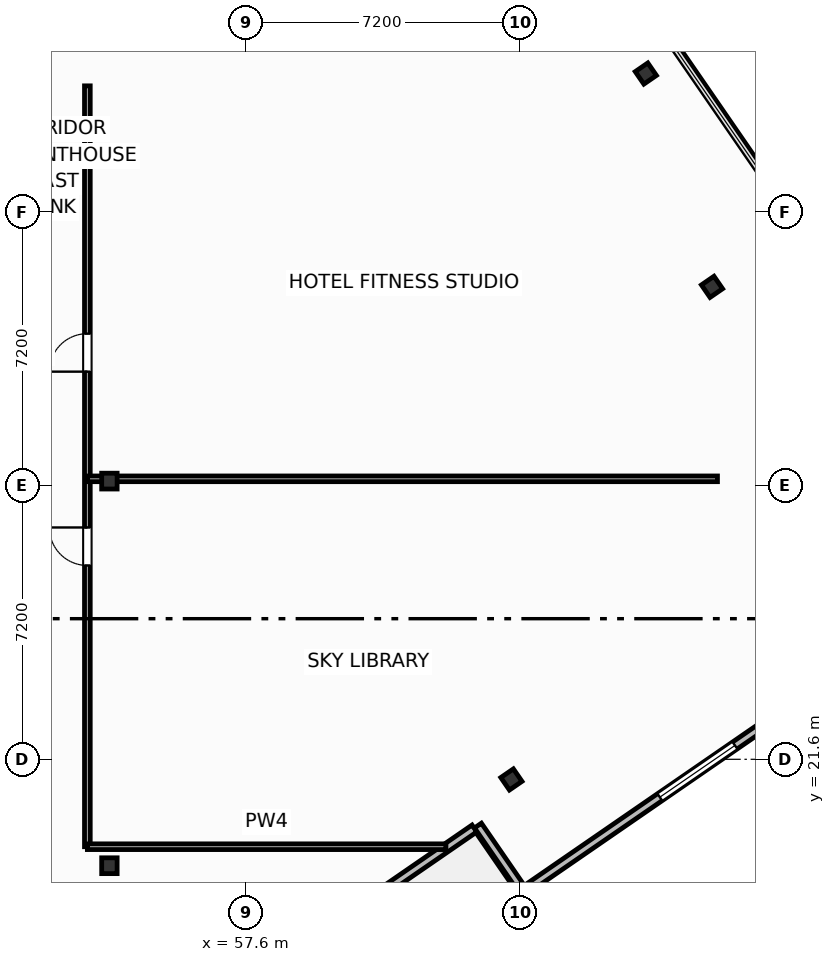
"""IFC4 building model, lengths in metres.
Left out: names, types, materials, properties, quantities, classifications, styles, units other than length and angle.
Written with IfcOpenShell. Run it as: python <this file> out.ifc"""

import sys

from ifc_helpers import new_model, si_unit, direction, frame, frame_2d, origin, origin_2d, place, context, subcontext, project, spatial, rectangle, i_section, extrude, element, fill, save


model = new_model("IFC4")
c1 = context("Model", 3, precision=1e-05, world=origin(), true_north=direction((0.0, 1.0)))
c2 = subcontext(c1, "Body", "Model", "MODEL_VIEW")
j1 = project(units=[si_unit("LENGTHUNIT", "METRE"), si_unit("PLANEANGLEUNIT", "RADIAN")], contexts=[c1])
p1 = place(None, origin())
s1 = spatial("IfcSite", under=j1, at=p1, CompositionType="ELEMENT")
p2 = place(p1, origin())
s2 = spatial("IfcBuilding", under=s1, at=p2, CompositionType="ELEMENT")
p3 = place(p2, frame((0.0, 0.0, 284.1)))
s3 = spatial("IfcBuildingStorey", under=s2, at=p3, CompositionType="ELEMENT", Elevation=284.1)
for number, where, z_axis, x_axis in (
    (1, (54.0, 18.8, 0.0), (0.0, 0.0, 1.0), (1.0, 0.0, 0.0)),
    (2, (54.0, 28.92, 0.0), (0.0, 0.0, 1.0), (1.0, 0.0, 0.0)),
):
    element("IfcColumn", number, at=place(p3, frame(where, z_axis=z_axis, x_axis=x_axis)), inside=s3, PredefinedType="COLUMN", context=c2, shape_type="SweptSolid", body=[
        extrude(i_section(OverallWidth=0.406, OverallDepth=0.416, WebThickness=0.03, FlangeThickness=0.048, FilletRadius=0.025, at=origin_2d()), origin(), (0.0, 0.0, 1.0), 3.7),
    ])
for number, where, z_axis, x_axis in (
    (3, (64.578, 21.07, 0.0), (0.0, 0.0, 1.0), (0.824, 0.567, 0.0)),
    (4, (69.857, 34.031, 0.0), (0.0, 0.0, 1.0), (0.824, 0.567, 0.0)),
    (5, (68.115, 39.644, 0.0), (0.0, 0.0, 1.0), (0.824, 0.567, 0.0)),
):
    element("IfcColumn", number, at=place(p3, frame(where, z_axis=z_axis, x_axis=x_axis)), inside=s3, PredefinedType="COLUMN", context=c2, shape_type="SweptSolid", body=[
        extrude(i_section(OverallWidth=0.401, OverallDepth=0.399, WebThickness=0.025, FlangeThickness=0.04, FilletRadius=0.022, at=origin_2d()), origin(), (0.0, 0.0, 1.0), 3.7),
    ])
p4 = place(p3, frame((63.605, 19.78, 0.0), z_axis=(0.0, 0.0, 1.0), x_axis=(-0.823541290762, -0.567256328665, 0.0)))
e6 = element("IfcWall", 6, at=p4, inside=s3, PredefinedType="SOLIDWALL", context=c2, shape_type="SweptSolid", body=[
    extrude(rectangle(XDim=5.567, YDim=0.22, at=frame_2d((2.784, 0.0))), origin(), (0.0, 0.0, 1.0), 2.73),
])
p5 = place(p4, frame((3.067, 0.0, 0.0)))
e7 = element("IfcOpeningElement", 7, at=p5, cuts=e6, PredefinedType="OPENING", context=c2, shape_type="SweptSolid", body=[
    extrude(rectangle(XDim=2.1, YDim=2.3, at=frame_2d((1.05, 1.15))), frame((0.0, 0.12, 0.0), z_axis=(0.0, -1.0, 0.0), x_axis=(1.0, 0.0, 0.0)), (0.0, 0.0, 1.0), 0.24),
])
p6 = place(p3, frame((63.698, 19.856, 0.0), z_axis=(0.0, 0.0, 1.0), x_axis=(0.567219383419, -0.823566737474, 0.0)))
e8 = element("IfcWall", 8, at=p6, inside=s3, PredefinedType="SOLIDWALL", context=c2, shape_type="SweptSolid", body=[
    extrude(rectangle(XDim=2.1, YDim=0.22, at=frame_2d((1.05, 0.0))), origin(), (0.0, 0.0, 1.0), 2.73),
])
p7 = place(p3, frame((64.992, 18.198, 0.0), z_axis=(0.0, 0.0, 1.0), x_axis=(0.823538117322, 0.56726093583, 0.0)))
e9 = element("IfcWall", 9, at=p7, inside=s3, PredefinedType="SOLIDWALL", context=c2, shape_type="SweptSolid", body=[
    extrude(rectangle(XDim=10.88, YDim=0.22, at=frame_2d((5.44, 0.0))), origin(), (0.0, 0.0, 1.0), 2.73),
])
p8 = place(p7, frame((4.24, 0.0, 0.8)))
e10 = element("IfcOpeningElement", 10, at=p8, cuts=e9, PredefinedType="OPENING", context=c2, shape_type="SweptSolid", body=[
    extrude(rectangle(XDim=2.4, YDim=1.85, at=frame_2d((1.2, 0.925))), frame((0.0, 0.12, 0.0), z_axis=(0.0, -1.0, 0.0), x_axis=(1.0, 0.0, 0.0)), (0.0, 0.0, 1.0), 0.24),
])
p9 = place(p3, frame((53.42, 19.3, 0.0), z_axis=(0.0, 0.0, 1.0), x_axis=(0.0, 1.0, 0.0)))
e11 = element("IfcWall", 11, at=p9, inside=s3, PredefinedType="PARTITIONING", context=c2, shape_type="SweptSolid", body=[
    extrude(rectangle(XDim=20.02, YDim=0.15, at=frame_2d((10.01, 0.0))), origin(), (0.0, 0.0, 1.0), 3.45),
])
p10 = place(p9, frame((7.4, 0.0, 0.0)))
e12 = element("IfcOpeningElement", 12, at=p10, cuts=e11, PredefinedType="OPENING", context=c2, shape_type="SweptSolid", body=[
    extrude(rectangle(XDim=1.0, YDim=2.05, at=frame_2d((0.5, 1.025))), frame((0.0, 0.085, 0.0), z_axis=(0.0, -1.0, 0.0), x_axis=(1.0, 0.0, 0.0)), (0.0, 0.0, 1.0), 0.17),
])
p11 = place(p9, frame((12.5, 0.0, 0.0)))
e13 = element("IfcOpeningElement", 13, at=p11, cuts=e11, PredefinedType="OPENING", context=c2, shape_type="SweptSolid", body=[
    extrude(rectangle(XDim=1.0, YDim=2.05, at=frame_2d((0.5, 1.025))), frame((0.0, 0.085, 0.0), z_axis=(0.0, -1.0, 0.0), x_axis=(1.0, 0.0, 0.0)), (0.0, 0.0, 1.0), 0.17),
])
p12 = place(p3, frame((53.42, 19.3, 0.0), z_axis=(0.0, 0.0, 1.0), x_axis=(1.0, 0.0, 0.0)))
e14 = element("IfcWall", 14, at=p12, inside=s3, PredefinedType="PARTITIONING", context=c2, shape_type="SweptSolid", body=[
    extrude(rectangle(XDim=9.435, YDim=0.15, at=frame_2d((4.718, 0.0))), origin(), (0.0, 0.0, 1.0), 2.739),
])
p13 = place(p3, frame((53.42, 28.98, 0.0), z_axis=(0.0, 0.0, 1.0), x_axis=(1.0, 0.0, 0.0)))
e15 = element("IfcWall", 15, at=p13, inside=s3, PredefinedType="PARTITIONING", context=c2, shape_type="SweptSolid", body=[
    extrude(rectangle(XDim=16.58, YDim=0.15, at=frame_2d((8.29, 0.0))), origin(), (0.0, 0.0, 1.0), 2.662),
])
p14 = place(p8, origin())
e16 = element("IfcWindow", 16, at=p14, inside=s3, PartitioningType="SINGLE_PANEL", PredefinedType="WINDOW", context=c2, shape_type="SweptSolid", body=[
    extrude(rectangle(XDim=2.4, YDim=1.85, at=frame_2d((1.2, 0.925))), frame((0.0, 0.03, 0.0), z_axis=(0.0, -1.0, 0.0), x_axis=(1.0, 0.0, 0.0)), (0.0, 0.0, 1.0), 0.06),
])
fill(e10, e16)
p15 = place(p10, origin())
e17 = element("IfcDoor", 17, at=p15, inside=s3, OperationType="SINGLE_SWING_RIGHT", PredefinedType="DOOR", context=c2, shape_type="SweptSolid", body=[
    extrude(rectangle(XDim=1.0, YDim=2.05, at=frame_2d((0.5, 1.025))), frame((0.0, 0.025, 0.0), z_axis=(0.0, -1.0, 0.0), x_axis=(1.0, 0.0, 0.0)), (0.0, 0.0, 1.0), 0.05),
])
fill(e12, e17)
p16 = place(p11, origin())
e18 = element("IfcDoor", 18, at=p16, inside=s3, OperationType="SINGLE_SWING_LEFT", PredefinedType="DOOR", context=c2, shape_type="SweptSolid", body=[
    extrude(rectangle(XDim=1.0, YDim=2.05, at=frame_2d((0.5, 1.025))), frame((0.0, 0.025, 0.0), z_axis=(0.0, -1.0, 0.0), x_axis=(1.0, 0.0, 0.0)), (0.0, 0.0, 1.0), 0.05),
])
fill(e13, e18)
save(model, sys.argv[1])
